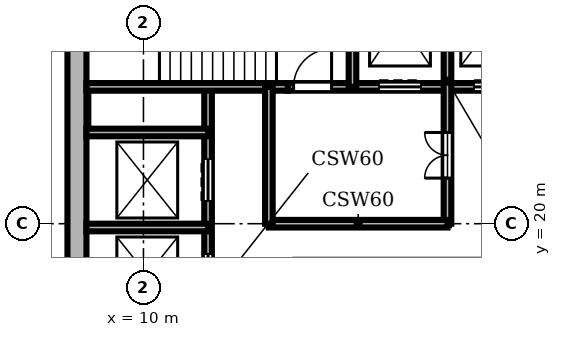
"""IFC4 building model, lengths in metres.
Left out: names, types, materials, properties, quantities, classifications, styles, units other than length and angle.
Written with IfcOpenShell. Run it as: python <this file> out.ifc"""

import sys

from ifc_helpers import new_model, si_unit, direction, frame, frame_2d, origin, place, context, subcontext, project, spatial, rectangle, extrude, element, fill, save


model = new_model("IFC4")
c1 = context("Model", 3, precision=1e-05, world=origin(), true_north=direction((0.0, 1.0)))
c2 = subcontext(c1, "Body", "Model", "MODEL_VIEW")
j1 = project(units=[si_unit("LENGTHUNIT", "METRE"), si_unit("PLANEANGLEUNIT", "RADIAN")], contexts=[c1])
p1 = place(None, origin())
s1 = spatial("IfcSite", under=j1, at=p1, CompositionType="ELEMENT")
p2 = place(p1, origin())
s2 = spatial("IfcBuilding", under=s1, at=p2, CompositionType="ELEMENT")
p3 = place(p2, frame((0.0, 0.0, 309.9)))
s3 = spatial("IfcBuildingStorey", under=s2, at=p3, CompositionType="ELEMENT", Elevation=309.9)
p4 = place(p3, frame((8.25, 27.5, 0.0), z_axis=(0.0, 0.0, 1.0), x_axis=(0.0, -1.0, 0.0)))
e1 = element("IfcWall", 1, at=p4, inside=s3, PredefinedType="SHEAR", context=c2, shape_type="SweptSolid", body=[
    extrude(rectangle(XDim=19.0, YDim=0.5, at=frame_2d((9.5, 0.0))), origin(), (0.0, 0.0, 1.0), 3.9),
])
p5 = place(p3, frame((8.5, 19.9, 0.0), z_axis=(0.0, 0.0, 1.0), x_axis=(1.0, 0.0, 0.0)))
e2 = element("IfcWall", 2, at=p5, inside=s3, PredefinedType="SHEAR", context=c2, shape_type="SweptSolid", body=[
    extrude(rectangle(XDim=3.2, YDim=0.2, at=frame_2d((1.6, 0.0))), origin(), (0.0, 0.0, 1.0), 3.58),
])
p6 = place(p3, frame((13.3, 20.0, 0.0), z_axis=(0.0, 0.0, 1.0), x_axis=(1.0, 0.0, 0.0)))
e3 = element("IfcWall", 3, at=p6, inside=s3, PredefinedType="SHEAR", context=c2, shape_type="SweptSolid", body=[
    extrude(rectangle(XDim=4.7, YDim=0.2, at=frame_2d((2.35, 0.0))), origin(), (0.0, 0.0, 1.0), 3.58),
])
p7 = place(p3, frame((8.5, 22.4, 0.0), z_axis=(0.0, 0.0, 1.0), x_axis=(1.0, 0.0, 0.0)))
e4 = element("IfcWall", 4, at=p7, inside=s3, PredefinedType="SHEAR", context=c2, shape_type="SweptSolid", body=[
    extrude(rectangle(XDim=3.2, YDim=0.2, at=frame_2d((1.6, 0.0))), origin(), (0.0, 0.0, 1.0), 3.58),
])
p8 = place(p3, frame((8.5, 23.6, 0.0), z_axis=(0.0, 0.0, 1.0), x_axis=(1.0, 0.0, 0.0)))
e5 = element("IfcWall", 5, at=p8, inside=s3, PredefinedType="SHEAR", context=c2, shape_type="SweptSolid", body=[
    extrude(rectangle(XDim=5.3, YDim=0.2, at=frame_2d((2.65, 0.0))), origin(), (0.0, 0.0, 1.0), 3.58),
])
p9 = place(p3, frame((13.8, 23.6, 0.0), z_axis=(0.0, 0.0, 1.0), x_axis=(1.0, 0.0, 0.0)))
e6 = element("IfcWall", 6, at=p9, inside=s3, PredefinedType="SHEAR", context=c2, shape_type="SweptSolid", body=[
    extrude(rectangle(XDim=13.7, YDim=0.2, at=frame_2d((6.85, 0.0))), origin(), (0.0, 0.0, 1.0), 3.58),
])
p10 = place(p9, frame((2.4, 0.0, 0.0)))
e7 = element("IfcOpeningElement", 7, at=p10, cuts=e6, PredefinedType="OPENING", context=c2, shape_type="SweptSolid", body=[
    extrude(rectangle(XDim=1.1, YDim=2.1, at=frame_2d((0.55, 1.05))), frame((0.0, 0.11, 0.0), z_axis=(0.0, -1.0, 0.0), x_axis=(1.0, 0.0, 0.0)), (0.0, 0.0, 1.0), 0.22),
])
p11 = place(p9, frame((4.9, 0.0, 0.0)))
e8 = element("IfcOpeningElement", 8, at=p11, cuts=e6, PredefinedType="OPENING", context=c2, shape_type="SweptSolid", body=[
    extrude(rectangle(XDim=1.1, YDim=2.1, at=frame_2d((0.55, 1.05))), frame((0.0, 0.11, 0.0), z_axis=(0.0, -1.0, 0.0), x_axis=(1.0, 0.0, 0.0)), (0.0, 0.0, 1.0), 0.22),
])
p12 = place(p9, frame((0.15, 0.0, 0.0)))
e9 = element("IfcOpeningElement", 9, at=p12, cuts=e6, PredefinedType="OPENING", context=c2, shape_type="SweptSolid", body=[
    extrude(rectangle(XDim=1.0, YDim=2.1, at=frame_2d((0.5, 1.05))), frame((0.0, 0.11, 0.0), z_axis=(0.0, -1.0, 0.0), x_axis=(1.0, 0.0, 0.0)), (0.0, 0.0, 1.0), 0.22),
])
p13 = place(p3, frame((11.7, 12.4, 0.0), z_axis=(0.0, 0.0, 1.0), x_axis=(0.0, 1.0, 0.0)))
e10 = element("IfcWall", 10, at=p13, inside=s3, PredefinedType="SHEAR", context=c2, shape_type="SweptSolid", body=[
    extrude(rectangle(XDim=11.2, YDim=0.2, at=frame_2d((5.6, 0.0))), origin(), (0.0, 0.0, 1.0), 3.58),
])
p14 = place(p13, frame((0.7, 0.0, 0.0)))
e11 = element("IfcOpeningElement", 11, at=p14, cuts=e10, PredefinedType="OPENING", context=c2, shape_type="SweptSolid", body=[
    extrude(rectangle(XDim=1.1, YDim=2.1, at=frame_2d((0.55, 1.05))), frame((0.0, 0.11, 0.0), z_axis=(0.0, -1.0, 0.0), x_axis=(1.0, 0.0, 0.0)), (0.0, 0.0, 1.0), 0.22),
])
p15 = place(p13, frame((3.2, 0.0, 0.0)))
e12 = element("IfcOpeningElement", 12, at=p15, cuts=e10, PredefinedType="OPENING", context=c2, shape_type="SweptSolid", body=[
    extrude(rectangle(XDim=1.1, YDim=2.1, at=frame_2d((0.55, 1.05))), frame((0.0, 0.11, 0.0), z_axis=(0.0, -1.0, 0.0), x_axis=(1.0, 0.0, 0.0)), (0.0, 0.0, 1.0), 0.22),
])
p16 = place(p13, frame((5.7, 0.0, 0.0)))
e13 = element("IfcOpeningElement", 13, at=p16, cuts=e10, PredefinedType="OPENING", context=c2, shape_type="SweptSolid", body=[
    extrude(rectangle(XDim=1.1, YDim=2.1, at=frame_2d((0.55, 1.05))), frame((0.0, 0.11, 0.0), z_axis=(0.0, -1.0, 0.0), x_axis=(1.0, 0.0, 0.0)), (0.0, 0.0, 1.0), 0.22),
])
p17 = place(p13, frame((8.2, 0.0, 0.0)))
e14 = element("IfcOpeningElement", 14, at=p17, cuts=e10, PredefinedType="OPENING", context=c2, shape_type="SweptSolid", body=[
    extrude(rectangle(XDim=1.1, YDim=2.1, at=frame_2d((0.55, 1.05))), frame((0.0, 0.11, 0.0), z_axis=(0.0, -1.0, 0.0), x_axis=(1.0, 0.0, 0.0)), (0.0, 0.0, 1.0), 0.22),
])
p18 = place(p3, frame((13.3, 20.0, 0.0), z_axis=(0.0, 0.0, 1.0), x_axis=(0.0, 1.0, 0.0)))
e15 = element("IfcWall", 15, at=p18, inside=s3, PredefinedType="SHEAR", context=c2, shape_type="SweptSolid", body=[
    extrude(rectangle(XDim=3.6, YDim=0.2, at=frame_2d((1.8, 0.0))), origin(), (0.0, 0.0, 1.0), 3.58),
])
p19 = place(p3, frame((15.5, 23.6, 0.0), z_axis=(0.0, 0.0, 1.0), x_axis=(0.0, 1.0, 0.0)))
e16 = element("IfcWall", 16, at=p19, inside=s3, PredefinedType="SHEAR", context=c2, shape_type="SweptSolid", body=[
    extrude(rectangle(XDim=3.9, YDim=0.2, at=frame_2d((1.95, 0.0))), origin(), (0.0, 0.0, 1.0), 3.58),
])
p20 = place(p3, frame((18.0, 20.0, 0.0), z_axis=(0.0, 0.0, 1.0), x_axis=(0.0, 1.0, 0.0)))
e17 = element("IfcWall", 17, at=p20, inside=s3, PredefinedType="SHEAR", context=c2, shape_type="SweptSolid", body=[
    extrude(rectangle(XDim=7.5, YDim=0.2, at=frame_2d((3.75, 0.0))), origin(), (0.0, 0.0, 1.0), 3.58),
])
p21 = place(p20, frame((1.2, 0.0, 0.0)))
e18 = element("IfcOpeningElement", 18, at=p21, cuts=e17, PredefinedType="OPENING", context=c2, shape_type="SweptSolid", body=[
    extrude(rectangle(XDim=1.2, YDim=2.1, at=frame_2d((0.6, 1.05))), frame((0.0, 0.11, 0.0), z_axis=(0.0, -1.0, 0.0), x_axis=(1.0, 0.0, 0.0)), (0.0, 0.0, 1.0), 0.22),
])
p22 = place(p16, origin())
e19 = element("IfcDoor", 19, at=p22, inside=s3, OperationType="DOUBLE_DOOR_SLIDING", PredefinedType="DOOR", context=c2, shape_type="SweptSolid", body=[
    extrude(rectangle(XDim=1.1, YDim=2.1, at=frame_2d((0.55, 1.05))), frame((0.0, 0.025, 0.0), z_axis=(0.0, -1.0, 0.0), x_axis=(1.0, 0.0, 0.0)), (0.0, 0.0, 1.0), 0.05),
])
fill(e13, e19)
p23 = place(p17, origin())
e20 = element("IfcDoor", 20, at=p23, inside=s3, OperationType="DOUBLE_DOOR_SLIDING", PredefinedType="DOOR", context=c2, shape_type="SweptSolid", body=[
    extrude(rectangle(XDim=1.1, YDim=2.1, at=frame_2d((0.55, 1.05))), frame((0.0, 0.025, 0.0), z_axis=(0.0, -1.0, 0.0), x_axis=(1.0, 0.0, 0.0)), (0.0, 0.0, 1.0), 0.05),
])
fill(e14, e20)
p24 = place(p10, origin())
e21 = element("IfcDoor", 21, at=p24, inside=s3, OperationType="DOUBLE_DOOR_SLIDING", PredefinedType="DOOR", context=c2, shape_type="SweptSolid", body=[
    extrude(rectangle(XDim=1.1, YDim=2.1, at=frame_2d((0.55, 1.05))), frame((0.0, 0.025, 0.0), z_axis=(0.0, -1.0, 0.0), x_axis=(1.0, 0.0, 0.0)), (0.0, 0.0, 1.0), 0.05),
])
fill(e7, e21)
p25 = place(p11, origin())
e22 = element("IfcDoor", 22, at=p25, inside=s3, OperationType="DOUBLE_DOOR_SLIDING", PredefinedType="DOOR", context=c2, shape_type="SweptSolid", body=[
    extrude(rectangle(XDim=1.1, YDim=2.1, at=frame_2d((0.55, 1.05))), frame((0.0, 0.025, 0.0), z_axis=(0.0, -1.0, 0.0), x_axis=(1.0, 0.0, 0.0)), (0.0, 0.0, 1.0), 0.05),
])
fill(e8, e22)
p26 = place(p12, origin())
e23 = element("IfcDoor", 23, at=p26, inside=s3, OperationType="SINGLE_SWING_RIGHT", PredefinedType="DOOR", context=c2, shape_type="SweptSolid", body=[
    extrude(rectangle(XDim=1.0, YDim=2.1, at=frame_2d((0.5, 1.05))), frame((0.0, 0.025, 0.0), z_axis=(0.0, -1.0, 0.0), x_axis=(1.0, 0.0, 0.0)), (0.0, 0.0, 1.0), 0.05),
])
fill(e9, e23)
p27 = place(p21, origin())
e24 = element("IfcDoor", 24, at=p27, inside=s3, OperationType="DOUBLE_DOOR_SINGLE_SWING", PredefinedType="DOOR", context=c2, shape_type="SweptSolid", body=[
    extrude(rectangle(XDim=1.2, YDim=2.1, at=frame_2d((0.6, 1.05))), frame((0.0, 0.025, 0.0), z_axis=(0.0, -1.0, 0.0), x_axis=(1.0, 0.0, 0.0)), (0.0, 0.0, 1.0), 0.05),
])
fill(e18, e24)
save(model, sys.argv[1])
